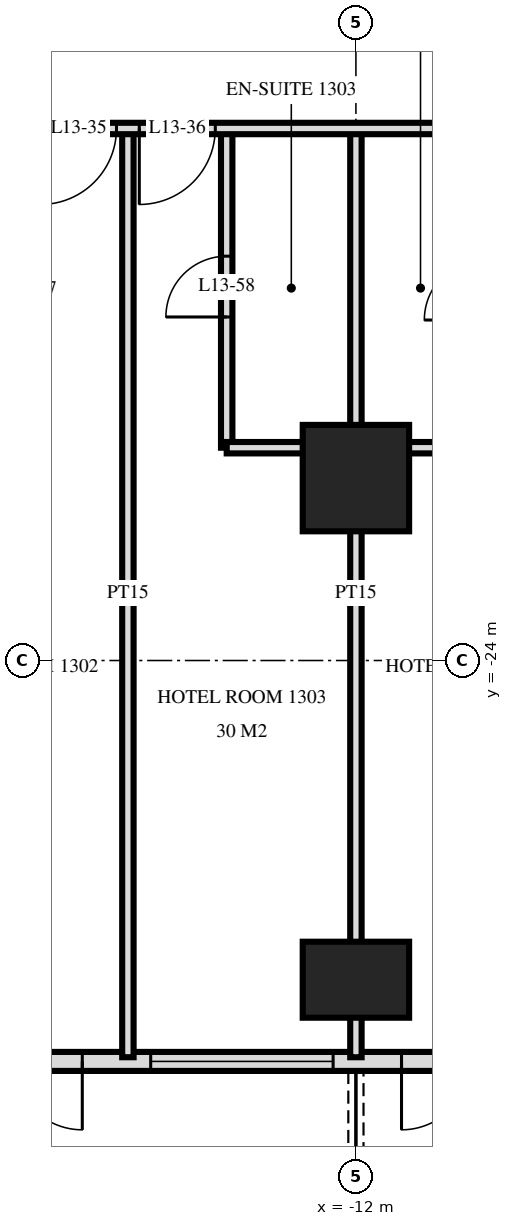
"""IFC4 building model, lengths in metres.
Left out: names, types, materials, properties, quantities, classifications, styles, units other than length and angle.
Written with IfcOpenShell. Run it as: python <this file> out.ifc"""

import sys

from ifc_helpers import new_model, si_unit, direction, frame, frame_2d, origin, origin_2d, place, context, subcontext, project, spatial, rectangle, extrude, element, fill, save


model = new_model("IFC4")
c1 = context("Model", 3, precision=1e-05, world=origin(), true_north=direction((0.0, 1.0)))
c2 = subcontext(c1, "Body", "Model", "MODEL_VIEW")
j1 = project(units=[si_unit("LENGTHUNIT", "METRE"), si_unit("PLANEANGLEUNIT", "RADIAN")], contexts=[c1])
p1 = place(None, origin())
s1 = spatial("IfcSite", under=j1, at=p1, CompositionType="ELEMENT")
p2 = place(p1, origin())
s2 = spatial("IfcBuilding", under=s1, at=p2, CompositionType="ELEMENT")
p3 = place(p2, frame((0.0, 0.0, 56.4)))
s3 = spatial("IfcBuildingStorey", under=s2, at=p3, CompositionType="ELEMENT", Elevation=56.4)
p4 = place(p3, frame((-12.0, -28.2, 0.0), z_axis=(0.0, 0.0, 1.0), x_axis=(1.0, 0.0, 0.0)))
e1 = element("IfcColumn", 1, at=p4, inside=s3, PredefinedType="COLUMN", context=c2, shape_type="SweptSolid", body=[
    extrude(rectangle(XDim=1.4, YDim=1.0, at=origin_2d()), origin(), (0.0, 0.0, 1.0), 3.6),
])
p5 = place(p3, frame((-12.0, -21.6, 0.0), z_axis=(0.0, 0.0, 1.0), x_axis=(1.0, 0.0, 0.0)))
e2 = element("IfcColumn", 2, at=p5, inside=s3, PredefinedType="COLUMN", context=c2, shape_type="SweptSolid", body=[
    extrude(rectangle(XDim=1.4, YDim=1.4, at=origin_2d()), origin(), (0.0, 0.0, 1.0), 3.6),
])
p6 = place(p3, frame((-28.775, -29.275, 0.0), z_axis=(0.0, 0.0, 1.0), x_axis=(1.0, 0.0, 0.0)))
e3 = element("IfcWall", 3, at=p6, inside=s3, PredefinedType="SOLIDWALL", context=c2, shape_type="SweptSolid", body=[
    extrude(rectangle(XDim=57.551, YDim=0.25, at=frame_2d((28.775, 0.0))), origin(), (0.0, 0.0, 1.0), 3.32),
])
p7 = place(p6, frame((0.575, 0.0, 0.0)))
e4 = element("IfcOpeningElement", 4, at=p7, cuts=e3, PredefinedType="OPENING", context=c2, shape_type="SweptSolid", body=[
    extrude(rectangle(XDim=1.8, YDim=2.4, at=frame_2d((0.9, 1.2))), frame((0.0, 0.135, 0.0), z_axis=(0.0, -1.0, 0.0), x_axis=(1.0, 0.0, 0.0)), (0.0, 0.0, 1.0), 0.27),
])
p8 = place(p6, frame((5.375, 0.0, 0.0)))
e5 = element("IfcOpeningElement", 5, at=p8, cuts=e3, PredefinedType="OPENING", context=c2, shape_type="SweptSolid", body=[
    extrude(rectangle(XDim=1.8, YDim=2.4, at=frame_2d((0.9, 1.2))), frame((0.0, 0.135, 0.0), z_axis=(0.0, -1.0, 0.0), x_axis=(1.0, 0.0, 0.0)), (0.0, 0.0, 1.0), 0.27),
])
p9 = place(p6, frame((8.075, 0.0, 0.3)))
e6 = element("IfcOpeningElement", 6, at=p9, cuts=e3, PredefinedType="OPENING", context=c2, shape_type="SweptSolid", body=[
    extrude(rectangle(XDim=2.4, YDim=2.1, at=frame_2d((1.2, 1.05))), frame((0.0, 0.135, 0.0), z_axis=(0.0, -1.0, 0.0), x_axis=(1.0, 0.0, 0.0)), (0.0, 0.0, 1.0), 0.27),
])
p10 = place(p6, frame((11.375, 0.0, 0.0)))
e7 = element("IfcOpeningElement", 7, at=p10, cuts=e3, PredefinedType="OPENING", context=c2, shape_type="SweptSolid", body=[
    extrude(rectangle(XDim=1.8, YDim=2.4, at=frame_2d((0.9, 1.2))), frame((0.0, 0.135, 0.0), z_axis=(0.0, -1.0, 0.0), x_axis=(1.0, 0.0, 0.0)), (0.0, 0.0, 1.0), 0.27),
])
p11 = place(p6, frame((14.075, 0.0, 0.3)))
e8 = element("IfcOpeningElement", 8, at=p11, cuts=e3, PredefinedType="OPENING", context=c2, shape_type="SweptSolid", body=[
    extrude(rectangle(XDim=2.4, YDim=2.1, at=frame_2d((1.2, 1.05))), frame((0.0, 0.135, 0.0), z_axis=(0.0, -1.0, 0.0), x_axis=(1.0, 0.0, 0.0)), (0.0, 0.0, 1.0), 0.27),
])
p12 = place(p6, frame((17.375, 0.0, 0.0)))
e9 = element("IfcOpeningElement", 9, at=p12, cuts=e3, PredefinedType="OPENING", context=c2, shape_type="SweptSolid", body=[
    extrude(rectangle(XDim=1.8, YDim=2.4, at=frame_2d((0.9, 1.2))), frame((0.0, 0.135, 0.0), z_axis=(0.0, -1.0, 0.0), x_axis=(1.0, 0.0, 0.0)), (0.0, 0.0, 1.0), 0.27),
])
p13 = place(p6, frame((20.075, 0.0, 0.3)))
e10 = element("IfcOpeningElement", 10, at=p13, cuts=e3, PredefinedType="OPENING", context=c2, shape_type="SweptSolid", body=[
    extrude(rectangle(XDim=2.4, YDim=2.1, at=frame_2d((1.2, 1.05))), frame((0.0, 0.135, 0.0), z_axis=(0.0, -1.0, 0.0), x_axis=(1.0, 0.0, 0.0)), (0.0, 0.0, 1.0), 0.27),
])
p14 = place(p6, frame((23.075, 0.0, 0.3)))
e11 = element("IfcOpeningElement", 11, at=p14, cuts=e3, PredefinedType="OPENING", context=c2, shape_type="SweptSolid", body=[
    extrude(rectangle(XDim=2.4, YDim=2.1, at=frame_2d((1.2, 1.05))), frame((0.0, 0.135, 0.0), z_axis=(0.0, -1.0, 0.0), x_axis=(1.0, 0.0, 0.0)), (0.0, 0.0, 1.0), 0.27),
])
p15 = place(p6, frame((26.375, 0.0, 0.0)))
e12 = element("IfcOpeningElement", 12, at=p15, cuts=e3, PredefinedType="OPENING", context=c2, shape_type="SweptSolid", body=[
    extrude(rectangle(XDim=1.8, YDim=2.4, at=frame_2d((0.9, 1.2))), frame((0.0, 0.135, 0.0), z_axis=(0.0, -1.0, 0.0), x_axis=(1.0, 0.0, 0.0)), (0.0, 0.0, 1.0), 0.27),
])
p16 = place(p6, frame((29.075, 0.0, 0.3)))
e13 = element("IfcOpeningElement", 13, at=p16, cuts=e3, PredefinedType="OPENING", context=c2, shape_type="SweptSolid", body=[
    extrude(rectangle(XDim=2.4, YDim=2.1, at=frame_2d((1.2, 1.05))), frame((0.0, 0.135, 0.0), z_axis=(0.0, -1.0, 0.0), x_axis=(1.0, 0.0, 0.0)), (0.0, 0.0, 1.0), 0.27),
])
p17 = place(p6, frame((32.375, 0.0, 0.0)))
e14 = element("IfcOpeningElement", 14, at=p17, cuts=e3, PredefinedType="OPENING", context=c2, shape_type="SweptSolid", body=[
    extrude(rectangle(XDim=1.8, YDim=2.4, at=frame_2d((0.9, 1.2))), frame((0.0, 0.135, 0.0), z_axis=(0.0, -1.0, 0.0), x_axis=(1.0, 0.0, 0.0)), (0.0, 0.0, 1.0), 0.27),
])
p18 = place(p6, frame((35.375, 0.0, 0.0)))
e15 = element("IfcOpeningElement", 15, at=p18, cuts=e3, PredefinedType="OPENING", context=c2, shape_type="SweptSolid", body=[
    extrude(rectangle(XDim=1.8, YDim=2.4, at=frame_2d((0.9, 1.2))), frame((0.0, 0.135, 0.0), z_axis=(0.0, -1.0, 0.0), x_axis=(1.0, 0.0, 0.0)), (0.0, 0.0, 1.0), 0.27),
])
p19 = place(p6, frame((38.075, 0.0, 0.3)))
e16 = element("IfcOpeningElement", 16, at=p19, cuts=e3, PredefinedType="OPENING", context=c2, shape_type="SweptSolid", body=[
    extrude(rectangle(XDim=2.4, YDim=2.1, at=frame_2d((1.2, 1.05))), frame((0.0, 0.135, 0.0), z_axis=(0.0, -1.0, 0.0), x_axis=(1.0, 0.0, 0.0)), (0.0, 0.0, 1.0), 0.27),
])
p20 = place(p6, frame((41.375, 0.0, 0.0)))
e17 = element("IfcOpeningElement", 17, at=p20, cuts=e3, PredefinedType="OPENING", context=c2, shape_type="SweptSolid", body=[
    extrude(rectangle(XDim=1.8, YDim=2.4, at=frame_2d((0.9, 1.2))), frame((0.0, 0.135, 0.0), z_axis=(0.0, -1.0, 0.0), x_axis=(1.0, 0.0, 0.0)), (0.0, 0.0, 1.0), 0.27),
])
p21 = place(p6, frame((44.075, 0.0, 0.3)))
e18 = element("IfcOpeningElement", 18, at=p21, cuts=e3, PredefinedType="OPENING", context=c2, shape_type="SweptSolid", body=[
    extrude(rectangle(XDim=2.4, YDim=2.1, at=frame_2d((1.2, 1.05))), frame((0.0, 0.135, 0.0), z_axis=(0.0, -1.0, 0.0), x_axis=(1.0, 0.0, 0.0)), (0.0, 0.0, 1.0), 0.27),
])
p22 = place(p6, frame((47.075, 0.0, 0.3)))
e19 = element("IfcOpeningElement", 19, at=p22, cuts=e3, PredefinedType="OPENING", context=c2, shape_type="SweptSolid", body=[
    extrude(rectangle(XDim=2.4, YDim=2.1, at=frame_2d((1.2, 1.05))), frame((0.0, 0.135, 0.0), z_axis=(0.0, -1.0, 0.0), x_axis=(1.0, 0.0, 0.0)), (0.0, 0.0, 1.0), 0.27),
])
p23 = place(p6, frame((50.375, 0.0, 0.0)))
e20 = element("IfcOpeningElement", 20, at=p23, cuts=e3, PredefinedType="OPENING", context=c2, shape_type="SweptSolid", body=[
    extrude(rectangle(XDim=1.8, YDim=2.4, at=frame_2d((0.9, 1.2))), frame((0.0, 0.135, 0.0), z_axis=(0.0, -1.0, 0.0), x_axis=(1.0, 0.0, 0.0)), (0.0, 0.0, 1.0), 0.27),
])
p24 = place(p6, frame((53.375, 0.0, 0.0)))
e21 = element("IfcOpeningElement", 21, at=p24, cuts=e3, PredefinedType="OPENING", context=c2, shape_type="SweptSolid", body=[
    extrude(rectangle(XDim=1.8, YDim=2.4, at=frame_2d((0.9, 1.2))), frame((0.0, 0.135, 0.0), z_axis=(0.0, -1.0, 0.0), x_axis=(1.0, 0.0, 0.0)), (0.0, 0.0, 1.0), 0.27),
])
p25 = place(p3, frame((-12.0, -29.22, 0.0), z_axis=(0.0, 0.0, 1.0), x_axis=(0.0, 1.0, 0.0)))
e22 = element("IfcWall", 22, at=p25, inside=s3, PredefinedType="PARTITIONING", context=c2, shape_type="SweptSolid", body=[
    extrude(rectangle(XDim=12.22, YDim=0.15, at=frame_2d((6.11, 0.0))), origin(), (0.0, 0.0, 1.0), 3.32),
])
p26 = place(p3, frame((-13.7, -21.2, 0.0), z_axis=(0.0, 0.0, 1.0), x_axis=(0.0, 1.0, 0.0)))
e23 = element("IfcWall", 23, at=p26, inside=s3, PredefinedType="PARTITIONING", context=c2, shape_type="SweptSolid", body=[
    extrude(rectangle(XDim=4.2, YDim=0.15, at=frame_2d((2.1, 0.0))), origin(), (0.0, 0.0, 1.0), 3.32),
])
p27 = place(p26, frame((1.72, 0.0, 0.0)))
e24 = element("IfcOpeningElement", 24, at=p27, cuts=e23, PredefinedType="OPENING", context=c2, shape_type="SweptSolid", body=[
    extrude(rectangle(XDim=0.8, YDim=2.1, at=frame_2d((0.4, 1.05))), frame((0.0, 0.085, 0.0), z_axis=(0.0, -1.0, 0.0), x_axis=(1.0, 0.0, 0.0)), (0.0, 0.0, 1.0), 0.17),
])
p28 = place(p3, frame((-15.0, -29.22, 0.0), z_axis=(0.0, 0.0, 1.0), x_axis=(0.0, 1.0, 0.0)))
e25 = element("IfcWall", 25, at=p28, inside=s3, PredefinedType="PARTITIONING", context=c2, shape_type="SweptSolid", body=[
    extrude(rectangle(XDim=12.22, YDim=0.15, at=frame_2d((6.11, 0.0))), origin(), (0.0, 0.0, 1.0), 3.32),
])
p29 = place(p3, frame((-13.7, -21.2, 0.0), z_axis=(0.0, 0.0, 1.0), x_axis=(1.0, 0.0, 0.0)))
e26 = element("IfcWall", 26, at=p29, inside=s3, PredefinedType="PARTITIONING", context=c2, shape_type="SweptSolid", body=[
    extrude(rectangle(XDim=3.4, YDim=0.15, at=frame_2d((1.7, 0.0))), origin(), (0.0, 0.0, 1.0), 3.32),
])
p30 = place(p3, frame((-33.12, -17.0, 0.0), z_axis=(0.0, 0.0, 1.0), x_axis=(1.0, 0.0, 0.0)))
e27 = element("IfcWall", 27, at=p30, inside=s3, PredefinedType="PARTITIONING", context=c2, shape_type="SweptSolid", body=[
    extrude(rectangle(XDim=66.24, YDim=0.15, at=frame_2d((33.12, 0.0))), origin(), (0.0, 0.0, 1.0), 3.32),
])
p31 = place(p30, frame((12.27, 0.0, 0.0)))
e28 = element("IfcOpeningElement", 28, at=p31, cuts=e27, PredefinedType="OPENING", context=c2, shape_type="SweptSolid", body=[
    extrude(rectangle(XDim=1.0, YDim=2.1, at=frame_2d((0.5, 1.05))), frame((0.0, 0.085, 0.0), z_axis=(0.0, -1.0, 0.0), x_axis=(1.0, 0.0, 0.0)), (0.0, 0.0, 1.0), 0.17),
])
p32 = place(p30, frame((16.97, 0.0, 0.0)))
e29 = element("IfcOpeningElement", 29, at=p32, cuts=e27, PredefinedType="OPENING", context=c2, shape_type="SweptSolid", body=[
    extrude(rectangle(XDim=1.0, YDim=2.1, at=frame_2d((0.5, 1.05))), frame((0.0, 0.085, 0.0), z_axis=(0.0, -1.0, 0.0), x_axis=(1.0, 0.0, 0.0)), (0.0, 0.0, 1.0), 0.17),
])
p33 = place(p30, frame((18.27, 0.0, 0.0)))
e30 = element("IfcOpeningElement", 30, at=p33, cuts=e27, PredefinedType="OPENING", context=c2, shape_type="SweptSolid", body=[
    extrude(rectangle(XDim=1.0, YDim=2.1, at=frame_2d((0.5, 1.05))), frame((0.0, 0.085, 0.0), z_axis=(0.0, -1.0, 0.0), x_axis=(1.0, 0.0, 0.0)), (0.0, 0.0, 1.0), 0.17),
])
p34 = place(p30, frame((22.97, 0.0, 0.0)))
e31 = element("IfcOpeningElement", 31, at=p34, cuts=e27, PredefinedType="OPENING", context=c2, shape_type="SweptSolid", body=[
    extrude(rectangle(XDim=1.0, YDim=2.1, at=frame_2d((0.5, 1.05))), frame((0.0, 0.085, 0.0), z_axis=(0.0, -1.0, 0.0), x_axis=(1.0, 0.0, 0.0)), (0.0, 0.0, 1.0), 0.17),
])
p35 = place(p30, frame((24.27, 0.0, 0.0)))
e32 = element("IfcOpeningElement", 32, at=p35, cuts=e27, PredefinedType="OPENING", context=c2, shape_type="SweptSolid", body=[
    extrude(rectangle(XDim=1.0, YDim=2.1, at=frame_2d((0.5, 1.05))), frame((0.0, 0.085, 0.0), z_axis=(0.0, -1.0, 0.0), x_axis=(1.0, 0.0, 0.0)), (0.0, 0.0, 1.0), 0.17),
])
p36 = place(p30, frame((28.97, 0.0, 0.0)))
e33 = element("IfcOpeningElement", 33, at=p36, cuts=e27, PredefinedType="OPENING", context=c2, shape_type="SweptSolid", body=[
    extrude(rectangle(XDim=1.0, YDim=2.1, at=frame_2d((0.5, 1.05))), frame((0.0, 0.085, 0.0), z_axis=(0.0, -1.0, 0.0), x_axis=(1.0, 0.0, 0.0)), (0.0, 0.0, 1.0), 0.17),
])
p37 = place(p30, frame((30.27, 0.0, 0.0)))
e34 = element("IfcOpeningElement", 34, at=p37, cuts=e27, PredefinedType="OPENING", context=c2, shape_type="SweptSolid", body=[
    extrude(rectangle(XDim=1.0, YDim=2.1, at=frame_2d((0.5, 1.05))), frame((0.0, 0.085, 0.0), z_axis=(0.0, -1.0, 0.0), x_axis=(1.0, 0.0, 0.0)), (0.0, 0.0, 1.0), 0.17),
])
p38 = place(p30, frame((33.82, 0.0, 0.0)))
e35 = element("IfcOpeningElement", 35, at=p38, cuts=e27, PredefinedType="OPENING", context=c2, shape_type="SweptSolid", body=[
    extrude(rectangle(XDim=1.0, YDim=2.1, at=frame_2d((0.5, 1.05))), frame((0.0, 0.085, 0.0), z_axis=(0.0, -1.0, 0.0), x_axis=(1.0, 0.0, 0.0)), (0.0, 0.0, 1.0), 0.17),
])
p39 = place(p30, frame((46.27, 0.0, 0.0)))
e36 = element("IfcOpeningElement", 36, at=p39, cuts=e27, PredefinedType="OPENING", context=c2, shape_type="SweptSolid", body=[
    extrude(rectangle(XDim=1.0, YDim=2.1, at=frame_2d((0.5, 1.05))), frame((0.0, 0.085, 0.0), z_axis=(0.0, -1.0, 0.0), x_axis=(1.0, 0.0, 0.0)), (0.0, 0.0, 1.0), 0.17),
])
p40 = place(p30, frame((52.97, 0.0, 0.0)))
e37 = element("IfcOpeningElement", 37, at=p40, cuts=e27, PredefinedType="OPENING", context=c2, shape_type="SweptSolid", body=[
    extrude(rectangle(XDim=1.0, YDim=2.1, at=frame_2d((0.5, 1.05))), frame((0.0, 0.085, 0.0), z_axis=(0.0, -1.0, 0.0), x_axis=(1.0, 0.0, 0.0)), (0.0, 0.0, 1.0), 0.17),
])
p41 = place(p30, frame((6.05, 0.0, 0.0)))
e38 = element("IfcOpeningElement", 38, at=p41, cuts=e27, PredefinedType="OPENING", context=c2, shape_type="SweptSolid", body=[
    extrude(rectangle(XDim=1.0, YDim=2.1, at=frame_2d((0.5, 1.05))), frame((0.0, 0.085, 0.0), z_axis=(0.0, -1.0, 0.0), x_axis=(1.0, 0.0, 0.0)), (0.0, 0.0, 1.0), 0.17),
])
p42 = place(p30, frame((59.15, 0.0, 0.0)))
e39 = element("IfcOpeningElement", 39, at=p42, cuts=e27, PredefinedType="OPENING", context=c2, shape_type="SweptSolid", body=[
    extrude(rectangle(XDim=1.0, YDim=2.1, at=frame_2d((0.5, 1.05))), frame((0.0, 0.085, 0.0), z_axis=(0.0, -1.0, 0.0), x_axis=(1.0, 0.0, 0.0)), (0.0, 0.0, 1.0), 0.17),
])
p43 = place(p10, frame((0.9, 0.0, 0.0), z_axis=(0.0, 0.0, 1.0), x_axis=(-1.0, 0.0, 0.0)))
e40 = element("IfcDoor", 40, at=p43, inside=s3, OperationType="DOUBLE_DOOR_SINGLE_SWING", PredefinedType="DOOR", context=c2, shape_type="SweptSolid", body=[
    extrude(rectangle(XDim=1.8, YDim=2.4, at=frame_2d((0.0, 1.2))), frame((0.0, -0.025, 0.0), z_axis=(0.0, 1.0, 0.0), x_axis=(-1.0, 0.0, 0.0)), (0.0, 0.0, 1.0), 0.05),
])
fill(e7, e40)
p44 = place(p11, origin())
e41 = element("IfcWindow", 41, at=p44, inside=s3, PartitioningType="SINGLE_PANEL", PredefinedType="WINDOW", context=c2, shape_type="SweptSolid", body=[
    extrude(rectangle(XDim=2.4, YDim=2.1, at=frame_2d((1.2, 1.05))), frame((0.0, 0.03, 0.0), z_axis=(0.0, -1.0, 0.0), x_axis=(1.0, 0.0, 0.0)), (0.0, 0.0, 1.0), 0.06),
])
fill(e8, e41)
p45 = place(p12, frame((0.9, 0.0, 0.0), z_axis=(0.0, 0.0, 1.0), x_axis=(-1.0, 0.0, 0.0)))
e42 = element("IfcDoor", 42, at=p45, inside=s3, OperationType="DOUBLE_DOOR_SINGLE_SWING", PredefinedType="DOOR", context=c2, shape_type="SweptSolid", body=[
    extrude(rectangle(XDim=1.8, YDim=2.4, at=frame_2d((0.0, 1.2))), frame((0.0, -0.025, 0.0), z_axis=(0.0, 1.0, 0.0), x_axis=(-1.0, 0.0, 0.0)), (0.0, 0.0, 1.0), 0.05),
])
fill(e9, e42)
p46 = place(p32, frame((0.5, 0.0, 0.0), z_axis=(0.0, 0.0, 1.0), x_axis=(-1.0, 0.0, 0.0)))
e43 = element("IfcDoor", 43, at=p46, inside=s3, OperationType="SINGLE_SWING_LEFT", PredefinedType="DOOR", context=c2, shape_type="SweptSolid", body=[
    extrude(rectangle(XDim=1.0, YDim=2.1, at=frame_2d((0.0, 1.05))), frame((0.0, -0.025, 0.0), z_axis=(0.0, 1.0, 0.0), x_axis=(-1.0, 0.0, 0.0)), (0.0, 0.0, 1.0), 0.05),
])
fill(e29, e43)
p47 = place(p33, frame((0.5, 0.0, 0.0), z_axis=(0.0, 0.0, 1.0), x_axis=(-1.0, 0.0, 0.0)))
e44 = element("IfcDoor", 44, at=p47, inside=s3, OperationType="SINGLE_SWING_LEFT", PredefinedType="DOOR", context=c2, shape_type="SweptSolid", body=[
    extrude(rectangle(XDim=1.0, YDim=2.1, at=frame_2d((0.0, 1.05))), frame((0.0, -0.025, 0.0), z_axis=(0.0, 1.0, 0.0), x_axis=(-1.0, 0.0, 0.0)), (0.0, 0.0, 1.0), 0.05),
])
fill(e30, e44)
p48 = place(p27, origin())
e45 = element("IfcDoor", 45, at=p48, inside=s3, OperationType="SINGLE_SWING_RIGHT", PredefinedType="DOOR", context=c2, shape_type="SweptSolid", body=[
    extrude(rectangle(XDim=0.8, YDim=2.1, at=frame_2d((0.4, 1.05))), frame((0.0, 0.025, 0.0), z_axis=(0.0, -1.0, 0.0), x_axis=(1.0, 0.0, 0.0)), (0.0, 0.0, 1.0), 0.05),
])
fill(e24, e45)
save(model, sys.argv[1])
